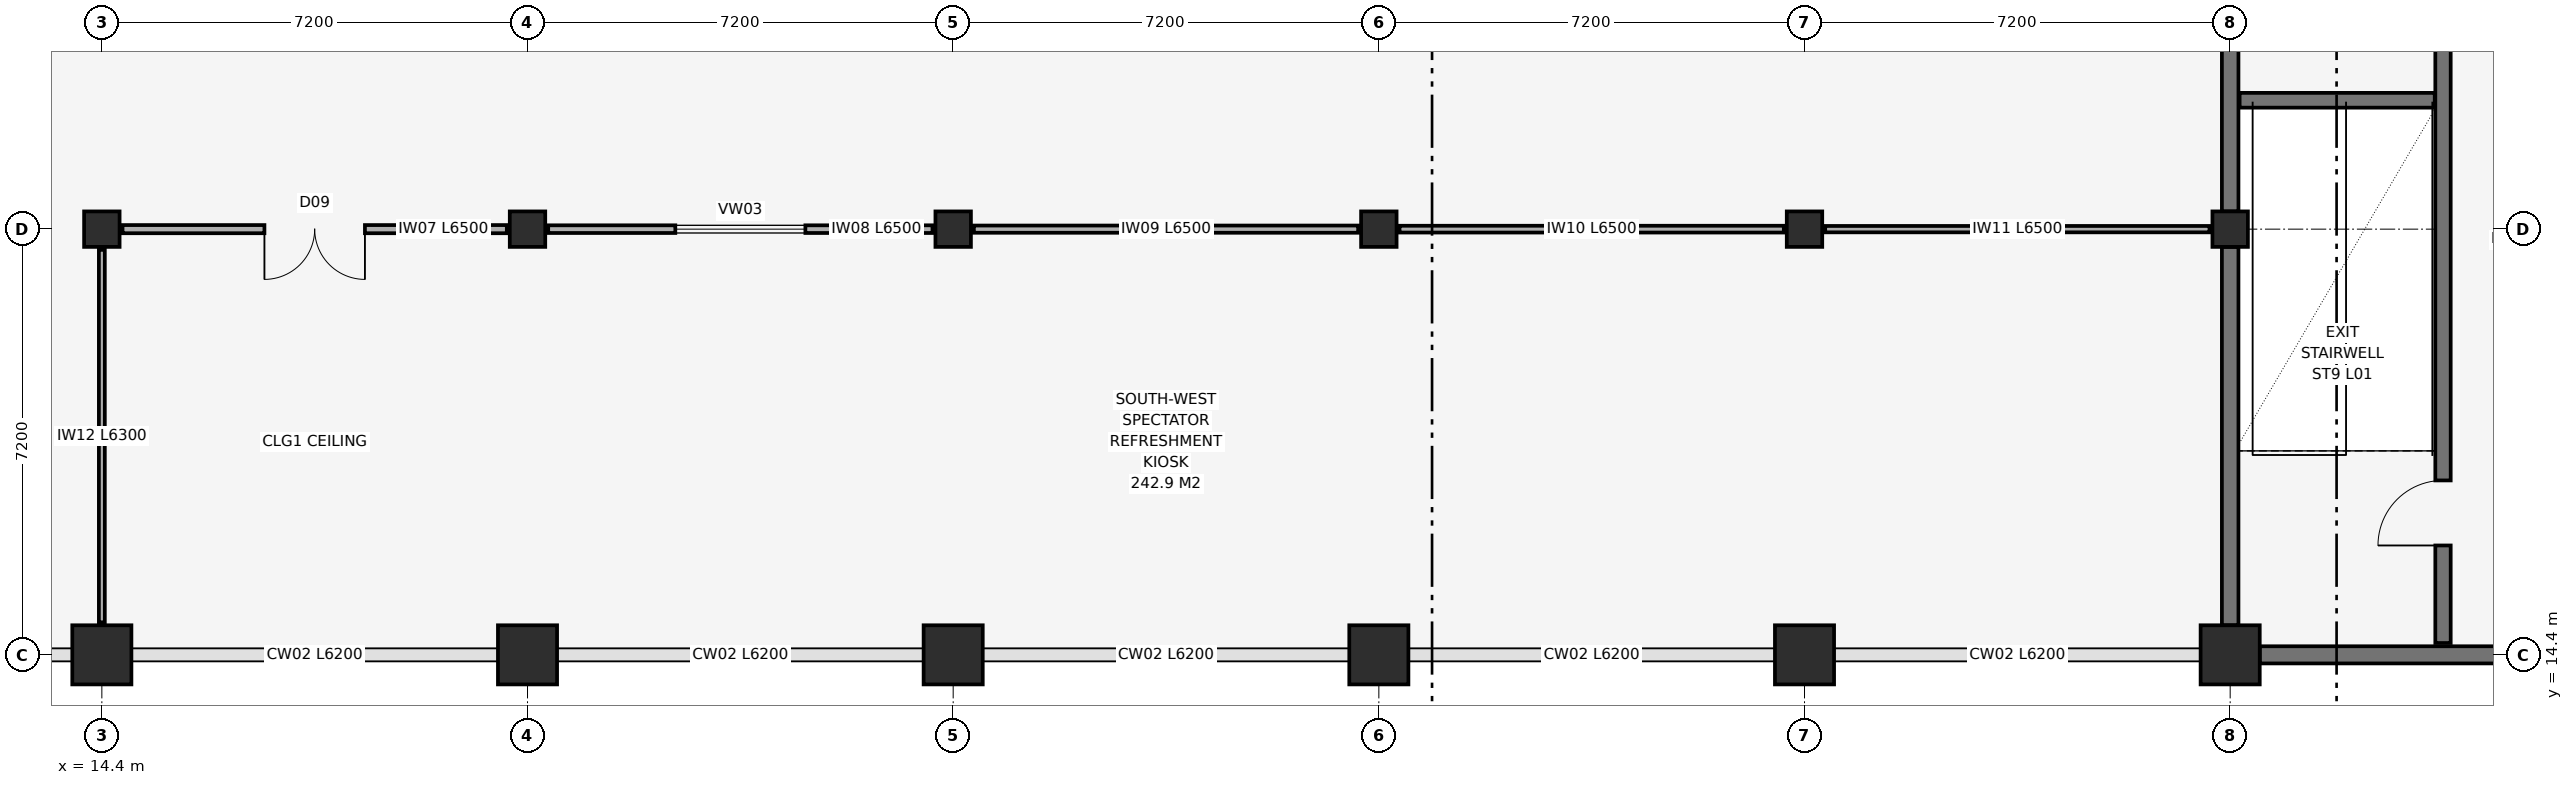
"""IFC4 building model, lengths in metres.
Left out: names, types, materials, properties, quantities, classifications, styles, units other than length and angle.
Written with IfcOpenShell. Run it as: python <this file> out.ifc"""

import sys

from ifc_helpers import new_model, si_unit, direction, frame, frame_2d, origin, origin_2d, place, context, subcontext, project, spatial, rectangle, extrude, element, fill, save


model = new_model("IFC4")
c1 = context("Model", 3, precision=1e-05, world=origin(), true_north=direction((0.0, 1.0)))
c2 = subcontext(c1, "Body", "Model", "MODEL_VIEW")
j1 = project(units=[si_unit("LENGTHUNIT", "METRE"), si_unit("PLANEANGLEUNIT", "RADIAN")], contexts=[c1])
p1 = place(None, origin())
s1 = spatial("IfcSite", under=j1, at=p1, CompositionType="ELEMENT")
p2 = place(p1, origin())
s2 = spatial("IfcBuilding", under=s1, at=p2, CompositionType="ELEMENT")
p3 = place(p2, frame((0.0, 0.0, 5.4)))
s3 = spatial("IfcBuildingStorey", under=s2, at=p3, CompositionType="ELEMENT", Elevation=5.4)
p4 = place(p3, frame((14.4, 14.4, 0.0), z_axis=(0.0, 0.0, 1.0), x_axis=(1.0, 0.0, 0.0)))
e1 = element("IfcColumn", 1, at=p4, inside=s3, PredefinedType="COLUMN", context=c2, shape_type="SweptSolid", body=[
    extrude(rectangle(XDim=1.0, YDim=1.0, at=origin_2d()), origin(), (0.0, 0.0, 1.0), 4.8),
])
p5 = place(p3, frame((14.4, 21.6, 0.0), z_axis=(0.0, 0.0, 1.0), x_axis=(1.0, 0.0, 0.0)))
e2 = element("IfcColumn", 2, at=p5, inside=s3, PredefinedType="COLUMN", context=c2, shape_type="SweptSolid", body=[
    extrude(rectangle(XDim=0.6, YDim=0.6, at=origin_2d()), origin(), (0.0, 0.0, 1.0), 4.8),
])
p6 = place(p3, frame((21.6, 14.4, 0.0), z_axis=(0.0, 0.0, 1.0), x_axis=(1.0, 0.0, 0.0)))
e3 = element("IfcColumn", 3, at=p6, inside=s3, PredefinedType="COLUMN", context=c2, shape_type="SweptSolid", body=[
    extrude(rectangle(XDim=1.0, YDim=1.0, at=origin_2d()), origin(), (0.0, 0.0, 1.0), 4.8),
])
p7 = place(p3, frame((21.6, 21.6, 0.0), z_axis=(0.0, 0.0, 1.0), x_axis=(1.0, 0.0, 0.0)))
e4 = element("IfcColumn", 4, at=p7, inside=s3, PredefinedType="COLUMN", context=c2, shape_type="SweptSolid", body=[
    extrude(rectangle(XDim=0.6, YDim=0.6, at=origin_2d()), origin(), (0.0, 0.0, 1.0), 4.8),
])
p8 = place(p3, frame((28.8, 14.4, 0.0), z_axis=(0.0, 0.0, 1.0), x_axis=(1.0, 0.0, 0.0)))
e5 = element("IfcColumn", 5, at=p8, inside=s3, PredefinedType="COLUMN", context=c2, shape_type="SweptSolid", body=[
    extrude(rectangle(XDim=1.0, YDim=1.0, at=origin_2d()), origin(), (0.0, 0.0, 1.0), 4.8),
])
p9 = place(p3, frame((28.8, 21.6, 0.0), z_axis=(0.0, 0.0, 1.0), x_axis=(1.0, 0.0, 0.0)))
e6 = element("IfcColumn", 6, at=p9, inside=s3, PredefinedType="COLUMN", context=c2, shape_type="SweptSolid", body=[
    extrude(rectangle(XDim=0.6, YDim=0.6, at=origin_2d()), origin(), (0.0, 0.0, 1.0), 4.8),
])
p10 = place(p3, frame((36.0, 14.4, 0.0), z_axis=(0.0, 0.0, 1.0), x_axis=(1.0, 0.0, 0.0)))
e7 = element("IfcColumn", 7, at=p10, inside=s3, PredefinedType="COLUMN", context=c2, shape_type="SweptSolid", body=[
    extrude(rectangle(XDim=1.0, YDim=1.0, at=origin_2d()), origin(), (0.0, 0.0, 1.0), 4.8),
])
p11 = place(p3, frame((36.0, 21.6, 0.0), z_axis=(0.0, 0.0, 1.0), x_axis=(1.0, 0.0, 0.0)))
e8 = element("IfcColumn", 8, at=p11, inside=s3, PredefinedType="COLUMN", context=c2, shape_type="SweptSolid", body=[
    extrude(rectangle(XDim=0.6, YDim=0.6, at=origin_2d()), origin(), (0.0, 0.0, 1.0), 4.8),
])
p12 = place(p3, frame((43.2, 14.4, 0.0), z_axis=(0.0, 0.0, 1.0), x_axis=(1.0, 0.0, 0.0)))
e9 = element("IfcColumn", 9, at=p12, inside=s3, PredefinedType="COLUMN", context=c2, shape_type="SweptSolid", body=[
    extrude(rectangle(XDim=1.0, YDim=1.0, at=origin_2d()), origin(), (0.0, 0.0, 1.0), 4.8),
])
p13 = place(p3, frame((43.2, 21.6, 0.0), z_axis=(0.0, 0.0, 1.0), x_axis=(1.0, 0.0, 0.0)))
e10 = element("IfcColumn", 10, at=p13, inside=s3, PredefinedType="COLUMN", context=c2, shape_type="SweptSolid", body=[
    extrude(rectangle(XDim=0.6, YDim=0.6, at=origin_2d()), origin(), (0.0, 0.0, 1.0), 4.8),
])
p14 = place(p3, frame((50.4, 14.4, 0.0), z_axis=(0.0, 0.0, 1.0), x_axis=(1.0, 0.0, 0.0)))
e11 = element("IfcColumn", 11, at=p14, inside=s3, PredefinedType="COLUMN", context=c2, shape_type="SweptSolid", body=[
    extrude(rectangle(XDim=1.0, YDim=1.0, at=origin_2d()), origin(), (0.0, 0.0, 1.0), 4.8),
])
p15 = place(p3, frame((50.4, 21.6, 0.0), z_axis=(0.0, 0.0, 1.0), x_axis=(1.0, 0.0, 0.0)))
e12 = element("IfcColumn", 12, at=p15, inside=s3, PredefinedType="COLUMN", context=c2, shape_type="SweptSolid", body=[
    extrude(rectangle(XDim=0.6, YDim=0.6, at=origin_2d()), origin(), (0.0, 0.0, 1.0), 4.8),
])
p16 = place(p3, frame((50.9, 14.4, 0.0), z_axis=(0.0, 0.0, 1.0), x_axis=(1.0, 0.0, 0.0)))
e13 = element("IfcWall", 13, at=p16, inside=s3, PredefinedType="SHEAR", context=c2, shape_type="SweptSolid", body=[
    extrude(rectangle(XDim=6.2, YDim=0.29, at=frame_2d((3.1, 0.0))), origin(), (0.0, 0.0, 1.0), 4.54),
])
p17 = place(p3, frame((50.4, 14.9, 0.0), z_axis=(0.0, 0.0, 1.0), x_axis=(0.0, 1.0, 0.0)))
e14 = element("IfcWall", 14, at=p17, inside=s3, PredefinedType="SHEAR", context=c2, shape_type="SweptSolid", body=[
    extrude(rectangle(XDim=6.4, YDim=0.28, at=frame_2d((3.2, 0.0))), origin(), (0.0, 0.0, 1.0), 4.54),
])
p18 = place(p3, frame((50.4, 21.9, 0.0), z_axis=(0.0, 0.0, 1.0), x_axis=(0.0, 1.0, 0.0)))
e15 = element("IfcWall", 15, at=p18, inside=s3, PredefinedType="SHEAR", context=c2, shape_type="SweptSolid", body=[
    extrude(rectangle(XDim=6.6, YDim=0.28, at=frame_2d((3.3, 0.0))), origin(), (0.0, 0.0, 1.0), 4.54),
])
p19 = place(p3, frame((54.0, 14.6, 0.0), z_axis=(0.0, 0.0, 1.0), x_axis=(0.0, 1.0, 0.0)))
e16 = element("IfcWall", 16, at=p19, inside=s3, PredefinedType="SHEAR", context=c2, shape_type="SweptSolid", body=[
    extrude(rectangle(XDim=14.0, YDim=0.26, at=frame_2d((7.0, 0.0))), origin(), (0.0, 0.0, 1.0), 4.54),
])
p20 = place(p19, frame((1.65, 0.0, 0.0)))
e17 = element("IfcOpeningElement", 17, at=p20, cuts=e16, PredefinedType="OPENING", context=c2, shape_type="SweptSolid", body=[
    extrude(rectangle(XDim=1.1, YDim=2.15, at=frame_2d((0.55, 1.075))), frame((0.0, 0.145, 0.0), z_axis=(0.0, -1.0, 0.0), x_axis=(1.0, 0.0, 0.0)), (0.0, 0.0, 1.0), 0.29),
])
p21 = place(p3, frame((50.56, 23.78, 0.0), z_axis=(0.0, 0.0, 1.0), x_axis=(1.0, 0.0, 0.0)))
e18 = element("IfcWall", 18, at=p21, inside=s3, PredefinedType="SHEAR", context=c2, shape_type="SweptSolid", body=[
    extrude(rectangle(XDim=3.3, YDim=0.25, at=frame_2d((1.65, 0.0))), origin(), (0.0, 0.0, 1.0), 4.54),
])
p22 = place(p3, frame((14.75, 21.6, 0.0), z_axis=(0.0, 0.0, 1.0), x_axis=(1.0, 0.0, 0.0)))
e19 = element("IfcWall", 19, at=p22, inside=s3, PredefinedType="PARTITIONING", context=c2, shape_type="SweptSolid", body=[
    extrude(rectangle(XDim=6.5, YDim=0.138, at=frame_2d((3.25, 0.0))), origin(), (0.0, 0.0, 1.0), 4.19),
])
p23 = place(p22, frame((2.4, 0.0, 0.0)))
e20 = element("IfcOpeningElement", 20, at=p23, cuts=e19, PredefinedType="OPENING", context=c2, shape_type="SweptSolid", body=[
    extrude(rectangle(XDim=1.7, YDim=2.2, at=frame_2d((0.85, 1.1))), frame((0.0, 0.084, 0.0), z_axis=(0.0, -1.0, 0.0), x_axis=(1.0, 0.0, 0.0)), (0.0, 0.0, 1.0), 0.168),
])
p24 = place(p3, frame((21.95, 21.6, 0.0), z_axis=(0.0, 0.0, 1.0), x_axis=(1.0, 0.0, 0.0)))
e21 = element("IfcWall", 21, at=p24, inside=s3, PredefinedType="PARTITIONING", context=c2, shape_type="SweptSolid", body=[
    extrude(rectangle(XDim=6.5, YDim=0.13, at=frame_2d((3.25, 0.0))), origin(), (0.0, 0.0, 1.0), 4.19),
])
p25 = place(p24, frame((2.15, 0.0, 0.95)))
e22 = element("IfcOpeningElement", 22, at=p25, cuts=e21, PredefinedType="OPENING", context=c2, shape_type="SweptSolid", body=[
    extrude(rectangle(XDim=2.2, YDim=1.5, at=frame_2d((1.1, 0.75))), frame((0.0, 0.08, 0.0), z_axis=(0.0, -1.0, 0.0), x_axis=(1.0, 0.0, 0.0)), (0.0, 0.0, 1.0), 0.16),
])
p26 = place(p3, frame((29.15, 21.6, 0.0), z_axis=(0.0, 0.0, 1.0), x_axis=(1.0, 0.0, 0.0)))
e23 = element("IfcWall", 23, at=p26, inside=s3, PredefinedType="PARTITIONING", context=c2, shape_type="SweptSolid", body=[
    extrude(rectangle(XDim=6.5, YDim=0.122, at=frame_2d((3.25, 0.0))), origin(), (0.0, 0.0, 1.0), 4.19),
])
p27 = place(p3, frame((36.35, 21.6, 0.0), z_axis=(0.0, 0.0, 1.0), x_axis=(1.0, 0.0, 0.0)))
e24 = element("IfcWall", 24, at=p27, inside=s3, PredefinedType="PARTITIONING", context=c2, shape_type="SweptSolid", body=[
    extrude(rectangle(XDim=6.5, YDim=0.115, at=frame_2d((3.25, 0.0))), origin(), (0.0, 0.0, 1.0), 4.19),
])
p28 = place(p3, frame((43.55, 21.6, 0.0), z_axis=(0.0, 0.0, 1.0), x_axis=(1.0, 0.0, 0.0)))
e25 = element("IfcWall", 25, at=p28, inside=s3, PredefinedType="PARTITIONING", context=c2, shape_type="SweptSolid", body=[
    extrude(rectangle(XDim=6.5, YDim=0.108, at=frame_2d((3.25, 0.0))), origin(), (0.0, 0.0, 1.0), 4.19),
])
p29 = place(p3, frame((14.4, 14.95, 0.0), z_axis=(0.0, 0.0, 1.0), x_axis=(0.0, 1.0, 0.0)))
e26 = element("IfcWall", 26, at=p29, inside=s3, PredefinedType="PARTITIONING", context=c2, shape_type="SweptSolid", body=[
    extrude(rectangle(XDim=6.3, YDim=0.1, at=frame_2d((3.15, 0.0))), origin(), (0.0, 0.0, 1.0), 4.15),
])
p30 = place(p20, origin())
e27 = element("IfcDoor", 27, at=p30, inside=s3, OperationType="SINGLE_SWING_LEFT", PredefinedType="DOOR", context=c2, shape_type="SweptSolid", body=[
    extrude(rectangle(XDim=1.1, YDim=2.15, at=frame_2d((0.55, 1.075))), frame((0.0, 0.025, 0.0), z_axis=(0.0, -1.0, 0.0), x_axis=(1.0, 0.0, 0.0)), (0.0, 0.0, 1.0), 0.05),
])
fill(e17, e27)
p31 = place(p23, frame((1.7, 0.0, 0.0), z_axis=(0.0, 0.0, 1.0), x_axis=(-1.0, 0.0, 0.0)))
e28 = element("IfcDoor", 28, at=p31, inside=s3, OperationType="DOUBLE_SWING_LEFT", PredefinedType="DOOR", context=c2, shape_type="SweptSolid", body=[
    extrude(rectangle(XDim=1.7, YDim=2.2, at=frame_2d((0.85, 1.1))), frame((0.0, 0.025, 0.0), z_axis=(0.0, -1.0, 0.0), x_axis=(1.0, 0.0, 0.0)), (0.0, 0.0, 1.0), 0.05),
])
fill(e20, e28)
p32 = place(p25, origin())
e29 = element("IfcWindow", 29, at=p32, inside=s3, PartitioningType="SINGLE_PANEL", PredefinedType="WINDOW", context=c2, shape_type="SweptSolid", body=[
    extrude(rectangle(XDim=2.2, YDim=1.5, at=frame_2d((1.1, 0.75))), frame((0.0, 0.03, 0.0), z_axis=(0.0, -1.0, 0.0), x_axis=(1.0, 0.0, 0.0)), (0.0, 0.0, 1.0), 0.06),
])
fill(e22, e29)
save(model, sys.argv[1])
